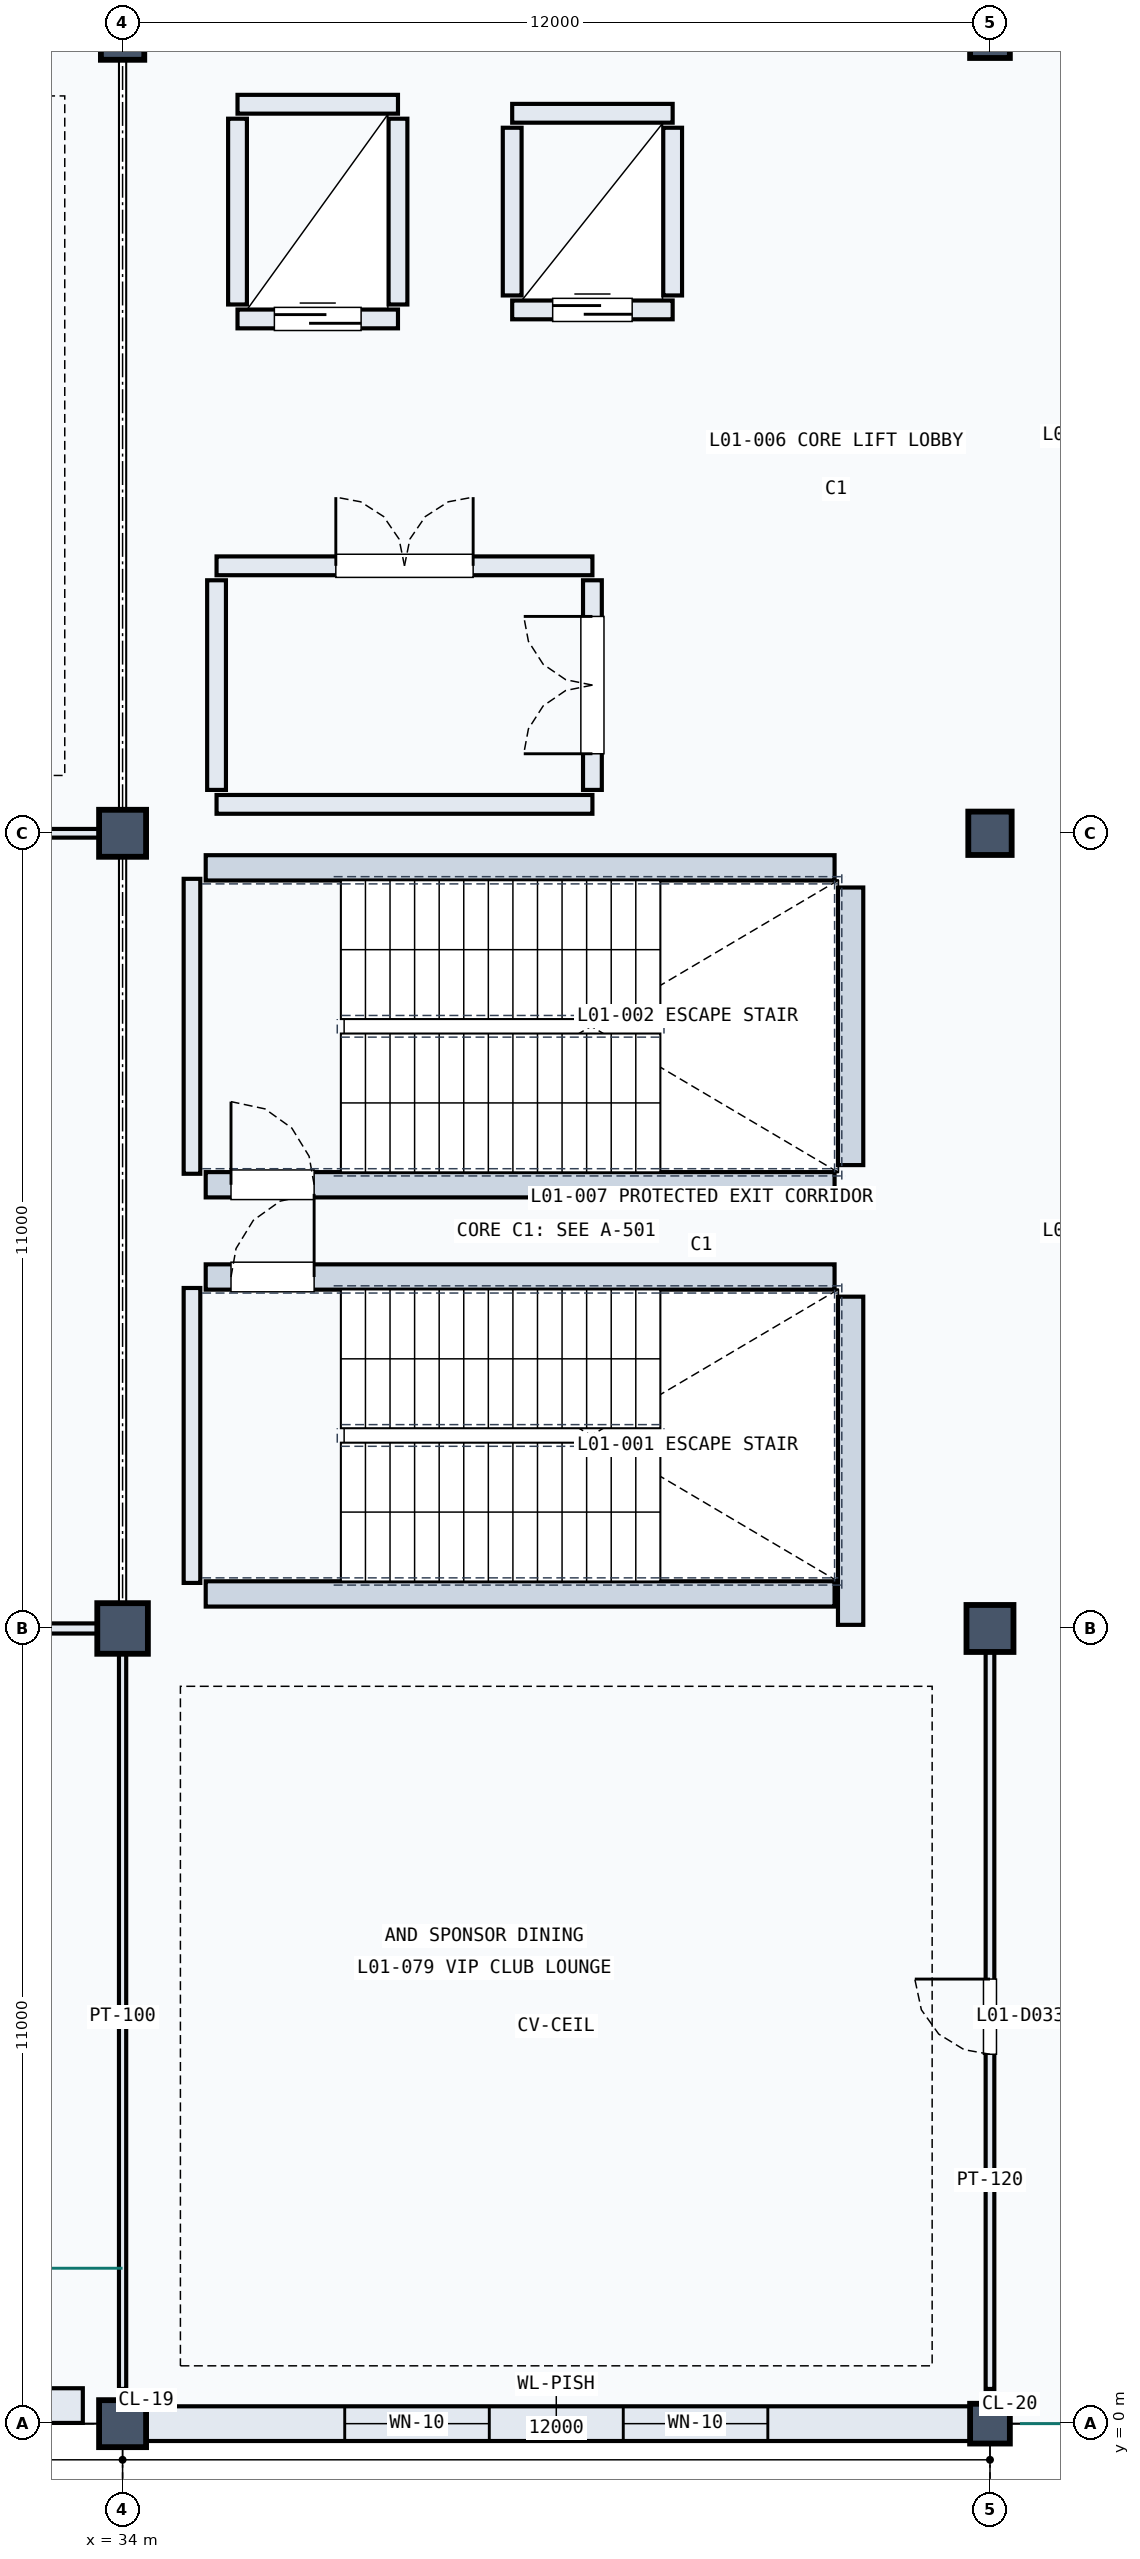
"""IFC4 building model, lengths in metres.
Left out: names, types, materials, properties, quantities, classifications, styles, units other than length and angle.
Written with IfcOpenShell. Run it as: python <this file> out.ifc"""

import sys

from ifc_helpers import new_model, si_unit, direction, frame, frame_2d, origin, origin_2d, place, context, subcontext, project, spatial, rectangle, circle, extrude, element, fill, save


model = new_model("IFC4")
c1 = context("Model", 3, precision=1e-05, world=origin(), true_north=direction((0.0, 1.0)))
c2 = subcontext(c1, "Body", "Model", "MODEL_VIEW")
j1 = project(units=[si_unit("LENGTHUNIT", "METRE"), si_unit("PLANEANGLEUNIT", "RADIAN")], contexts=[c1])
p1 = place(None, origin())
s1 = spatial("IfcSite", under=j1, at=p1, CompositionType="ELEMENT")
p2 = place(p1, origin())
s2 = spatial("IfcBuilding", under=s1, at=p2, CompositionType="ELEMENT")
p3 = place(p2, frame((0.0, 0.0, 5.4)))
s3 = spatial("IfcBuildingStorey", under=s2, at=p3, CompositionType="ELEMENT", Elevation=5.4)
p4 = place(p3, frame((34.0, 0.0, 0.0), z_axis=(0.0, 0.0, 1.0), x_axis=(1.0, 0.0, 0.0)))
e1 = element("IfcColumn", 1, at=p4, inside=s3, PredefinedType="COLUMN", context=c2, shape_type="SweptSolid", body=[
    extrude(circle(Radius=0.325, at=origin_2d()), origin(), (0.0, 0.0, 1.0), 4.8),
])
p5 = place(p3, frame((34.0, 11.0, 0.0), z_axis=(0.0, 0.0, 1.0), x_axis=(1.0, 0.0, 0.0)))
e2 = element("IfcColumn", 2, at=p5, inside=s3, PredefinedType="COLUMN", context=c2, shape_type="SweptSolid", body=[
    extrude(rectangle(XDim=0.7, YDim=0.7, at=origin_2d()), origin(), (0.0, 0.0, 1.0), 4.8),
])
p6 = place(p3, frame((34.0, 22.0, 0.0), z_axis=(0.0, 0.0, 1.0), x_axis=(1.0, 0.0, 0.0)))
e3 = element("IfcColumn", 3, at=p6, inside=s3, PredefinedType="COLUMN", context=c2, shape_type="SweptSolid", body=[
    extrude(rectangle(XDim=0.65, YDim=0.65, at=origin_2d()), origin(), (0.0, 0.0, 1.0), 4.8),
])
p7 = place(p3, frame((34.0, 33.0, 0.0), z_axis=(0.0, 0.0, 1.0), x_axis=(1.0, 0.0, 0.0)))
e4 = element("IfcColumn", 4, at=p7, inside=s3, PredefinedType="COLUMN", context=c2, shape_type="SweptSolid", body=[
    extrude(rectangle(XDim=0.6, YDim=0.6, at=origin_2d()), origin(), (0.0, 0.0, 1.0), 4.8),
])
p8 = place(p3, frame((46.0, 0.0, 0.0), z_axis=(0.0, 0.0, 1.0), x_axis=(1.0, 0.0, 0.0)))
e5 = element("IfcColumn", 5, at=p8, inside=s3, PredefinedType="COLUMN", context=c2, shape_type="SweptSolid", body=[
    extrude(circle(Radius=0.275, at=origin_2d()), origin(), (0.0, 0.0, 1.0), 4.8),
])
p9 = place(p3, frame((46.0, 11.0, 0.0), z_axis=(0.0, 0.0, 1.0), x_axis=(1.0, 0.0, 0.0)))
e6 = element("IfcColumn", 6, at=p9, inside=s3, PredefinedType="COLUMN", context=c2, shape_type="SweptSolid", body=[
    extrude(rectangle(XDim=0.65, YDim=0.65, at=origin_2d()), origin(), (0.0, 0.0, 1.0), 4.8),
])
p10 = place(p3, frame((46.0, 22.0, 0.0), z_axis=(0.0, 0.0, 1.0), x_axis=(1.0, 0.0, 0.0)))
e7 = element("IfcColumn", 7, at=p10, inside=s3, PredefinedType="COLUMN", context=c2, shape_type="SweptSolid", body=[
    extrude(rectangle(XDim=0.6, YDim=0.6, at=origin_2d()), origin(), (0.0, 0.0, 1.0), 4.8),
])
p11 = place(p3, frame((46.0, 33.0, 0.0), z_axis=(0.0, 0.0, 1.0), x_axis=(1.0, 0.0, 0.0)))
e8 = element("IfcColumn", 8, at=p11, inside=s3, PredefinedType="COLUMN", context=c2, shape_type="SweptSolid", body=[
    extrude(rectangle(XDim=0.55, YDim=0.55, at=origin_2d()), origin(), (0.0, 0.0, 1.0), 4.8),
])
p12 = place(p3, frame((30.6, 0.25, 0.0), z_axis=(0.0, 0.0, 1.0), x_axis=(1.0, 0.0, 0.0)))
e9 = element("IfcWall", 9, at=p12, inside=s3, PredefinedType="SOLIDWALL", context=c2, shape_type="SweptSolid", body=[
    extrude(rectangle(XDim=2.85, YDim=0.48, at=frame_2d((1.425, 0.0))), origin(), (0.0, 0.0, 1.0), 4.44),
])
p13 = place(p3, frame((34.22, 0.0, 0.0), z_axis=(0.0, 0.0, 1.0), x_axis=(1.0, 0.0, 0.0)))
e10 = element("IfcWall", 10, at=p13, inside=s3, PredefinedType="SOLIDWALL", context=c2, shape_type="SweptSolid", body=[
    extrude(rectangle(XDim=11.56, YDim=0.48, at=frame_2d((5.78, 0.0))), origin(), (0.0, 0.0, 1.0), 3.59),
])
p14 = place(p13, frame((2.853, 0.0, 0.9)))
e11 = element("IfcOpeningElement", 11, at=p14, cuts=e10, PredefinedType="OPENING", context=c2, shape_type="SweptSolid", body=[
    extrude(rectangle(XDim=2.0, YDim=1.65, at=frame_2d((1.0, 0.825))), frame((0.0, 0.25, 0.0), z_axis=(0.0, -1.0, 0.0), x_axis=(1.0, 0.0, 0.0)), (0.0, 0.0, 1.0), 0.5),
])
p15 = place(p13, frame((6.707, 0.0, 0.9)))
e12 = element("IfcOpeningElement", 12, at=p15, cuts=e10, PredefinedType="OPENING", context=c2, shape_type="SweptSolid", body=[
    extrude(rectangle(XDim=2.0, YDim=1.65, at=frame_2d((1.0, 0.825))), frame((0.0, 0.25, 0.0), z_axis=(0.0, -1.0, 0.0), x_axis=(1.0, 0.0, 0.0)), (0.0, 0.0, 1.0), 0.5),
])
p16 = place(p3, frame((34.96, 11.63, 0.0), z_axis=(0.0, 0.0, 1.0), x_axis=(0.0, 1.0, 0.0)))
e13 = element("IfcWall", 13, at=p16, inside=s3, PredefinedType="SOLIDWALL", context=c2, shape_type="SweptSolid", body=[
    extrude(rectangle(XDim=4.08, YDim=0.23, at=frame_2d((2.04, 0.0))), origin(), (0.0, 0.0, 1.0), 3.79),
])
p17 = place(p3, frame((44.072, 11.05, 0.0), z_axis=(0.0, 0.0, 1.0), x_axis=(0.0, 1.0, 0.0)))
e14 = element("IfcWall", 14, at=p17, inside=s3, PredefinedType="SOLIDWALL", context=c2, shape_type="SweptSolid", body=[
    extrude(rectangle(XDim=4.54, YDim=0.35, at=frame_2d((2.27, 0.0))), origin(), (0.0, 0.0, 1.0), 4.46),
])
p18 = place(p3, frame((35.15, 11.478, 0.0), z_axis=(0.0, 0.0, 1.0), x_axis=(1.0, 0.0, 0.0)))
e15 = element("IfcWall", 15, at=p18, inside=s3, PredefinedType="SOLIDWALL", context=c2, shape_type="SweptSolid", body=[
    extrude(rectangle(XDim=8.7, YDim=0.35, at=frame_2d((4.35, 0.0))), origin(), (0.0, 0.0, 1.0), 4.46),
])
p19 = place(p3, frame((35.15, 15.862, 0.0), z_axis=(0.0, 0.0, 1.0), x_axis=(1.0, 0.0, 0.0)))
e16 = element("IfcWall", 16, at=p19, inside=s3, PredefinedType="SOLIDWALL", context=c2, shape_type="SweptSolid", body=[
    extrude(rectangle(XDim=8.7, YDim=0.35, at=frame_2d((4.35, 0.0))), origin(), (0.0, 0.0, 1.0), 4.46),
])
p20 = place(p19, frame((0.35, 0.0, 0.0)))
e17 = element("IfcOpeningElement", 17, at=p20, cuts=e16, PredefinedType="OPENING", context=c2, shape_type="SweptSolid", body=[
    extrude(rectangle(XDim=1.15, YDim=2.2, at=frame_2d((0.575, 1.1))), frame((0.0, 0.185, 0.0), z_axis=(0.0, -1.0, 0.0), x_axis=(1.0, 0.0, 0.0)), (0.0, 0.0, 1.0), 0.37),
])
p21 = place(p3, frame((34.96, 17.29, 0.0), z_axis=(0.0, 0.0, 1.0), x_axis=(0.0, 1.0, 0.0)))
e18 = element("IfcWall", 18, at=p21, inside=s3, PredefinedType="SOLIDWALL", context=c2, shape_type="SweptSolid", body=[
    extrude(rectangle(XDim=4.08, YDim=0.23, at=frame_2d((2.04, 0.0))), origin(), (0.0, 0.0, 1.0), 3.79),
])
p22 = place(p3, frame((44.072, 17.41, 0.0), z_axis=(0.0, 0.0, 1.0), x_axis=(0.0, 1.0, 0.0)))
e19 = element("IfcWall", 19, at=p22, inside=s3, PredefinedType="SOLIDWALL", context=c2, shape_type="SweptSolid", body=[
    extrude(rectangle(XDim=3.84, YDim=0.35, at=frame_2d((1.92, 0.0))), origin(), (0.0, 0.0, 1.0), 4.46),
])
p23 = place(p3, frame((35.15, 17.138, 0.0), z_axis=(0.0, 0.0, 1.0), x_axis=(1.0, 0.0, 0.0)))
e20 = element("IfcWall", 20, at=p23, inside=s3, PredefinedType="SOLIDWALL", context=c2, shape_type="SweptSolid", body=[
    extrude(rectangle(XDim=8.7, YDim=0.35, at=frame_2d((4.35, 0.0))), origin(), (0.0, 0.0, 1.0), 4.46),
])
p24 = place(p23, frame((0.35, 0.0, 0.0)))
e21 = element("IfcOpeningElement", 21, at=p24, cuts=e20, PredefinedType="OPENING", context=c2, shape_type="SweptSolid", body=[
    extrude(rectangle(XDim=1.15, YDim=2.2, at=frame_2d((0.575, 1.1))), frame((0.0, 0.185, 0.0), z_axis=(0.0, -1.0, 0.0), x_axis=(1.0, 0.0, 0.0)), (0.0, 0.0, 1.0), 0.37),
])
p25 = place(p3, frame((35.15, 21.522, 0.0), z_axis=(0.0, 0.0, 1.0), x_axis=(1.0, 0.0, 0.0)))
e22 = element("IfcWall", 22, at=p25, inside=s3, PredefinedType="SOLIDWALL", context=c2, shape_type="SweptSolid", body=[
    extrude(rectangle(XDim=8.7, YDim=0.35, at=frame_2d((4.35, 0.0))), origin(), (0.0, 0.0, 1.0), 4.46),
])
p26 = place(p3, frame((35.59, 29.115, 0.0), z_axis=(0.0, 0.0, 1.0), x_axis=(1.0, 0.0, 0.0)))
e23 = element("IfcWall", 23, at=p26, inside=s3, PredefinedType="SOLIDWALL", context=c2, shape_type="SweptSolid", body=[
    extrude(rectangle(XDim=2.22, YDim=0.26, at=frame_2d((1.11, 0.0))), origin(), (0.0, 0.0, 1.0), 4.46),
])
p27 = place(p26, frame((0.51, 0.0, 0.0)))
e24 = element("IfcOpeningElement", 24, at=p27, cuts=e23, PredefinedType="OPENING", context=c2, shape_type="SweptSolid", body=[
    extrude(rectangle(XDim=1.2, YDim=2.2, at=frame_2d((0.6, 1.1))), frame((0.0, 0.14, 0.0), z_axis=(0.0, -1.0, 0.0), x_axis=(1.0, 0.0, 0.0)), (0.0, 0.0, 1.0), 0.28),
])
p28 = place(p3, frame((35.59, 32.085, 0.0), z_axis=(0.0, 0.0, 1.0), x_axis=(1.0, 0.0, 0.0)))
e25 = element("IfcWall", 25, at=p28, inside=s3, PredefinedType="SOLIDWALL", context=c2, shape_type="SweptSolid", body=[
    extrude(rectangle(XDim=2.22, YDim=0.26, at=frame_2d((1.11, 0.0))), origin(), (0.0, 0.0, 1.0), 4.46),
])
for number, where, z_axis, x_axis in (
    (26, (35.59, 29.315, 0.0), (0.0, 0.0, 1.0), (0.0, 1.0, 0.0)),
    (27, (37.81, 29.315, 0.0), (0.0, 0.0, 1.0), (0.0, 1.0, 0.0)),
):
    element("IfcWall", number, at=place(p3, frame(where, z_axis=z_axis, x_axis=x_axis)), inside=s3, PredefinedType="SOLIDWALL", context=c2, shape_type="SweptSolid", body=[
        extrude(rectangle(XDim=2.57, YDim=0.26, at=frame_2d((1.285, 0.0))), origin(), (0.0, 0.0, 1.0), 4.46),
    ])
p29 = place(p3, frame((39.39, 29.24, 0.0), z_axis=(0.0, 0.0, 1.0), x_axis=(1.0, 0.0, 0.0)))
e28 = element("IfcWall", 28, at=p29, inside=s3, PredefinedType="SOLIDWALL", context=c2, shape_type="SweptSolid", body=[
    extrude(rectangle(XDim=2.22, YDim=0.26, at=frame_2d((1.11, 0.0))), origin(), (0.0, 0.0, 1.0), 4.46),
])
p30 = place(p29, frame((0.56, 0.0, 0.0)))
e29 = element("IfcOpeningElement", 29, at=p30, cuts=e28, PredefinedType="OPENING", context=c2, shape_type="SweptSolid", body=[
    extrude(rectangle(XDim=1.1, YDim=2.15, at=frame_2d((0.55, 1.075))), frame((0.0, 0.14, 0.0), z_axis=(0.0, -1.0, 0.0), x_axis=(1.0, 0.0, 0.0)), (0.0, 0.0, 1.0), 0.28),
])
p31 = place(p3, frame((39.39, 31.96, 0.0), z_axis=(0.0, 0.0, 1.0), x_axis=(1.0, 0.0, 0.0)))
e30 = element("IfcWall", 30, at=p31, inside=s3, PredefinedType="SOLIDWALL", context=c2, shape_type="SweptSolid", body=[
    extrude(rectangle(XDim=2.22, YDim=0.26, at=frame_2d((1.11, 0.0))), origin(), (0.0, 0.0, 1.0), 4.46),
])
for number, where, z_axis, x_axis in (
    (31, (39.39, 29.44, 0.0), (0.0, 0.0, 1.0), (0.0, 1.0, 0.0)),
    (32, (41.61, 29.44, 0.0), (0.0, 0.0, 1.0), (0.0, 1.0, 0.0)),
):
    element("IfcWall", number, at=place(p3, frame(where, z_axis=z_axis, x_axis=x_axis)), inside=s3, PredefinedType="SOLIDWALL", context=c2, shape_type="SweptSolid", body=[
        extrude(rectangle(XDim=2.32, YDim=0.26, at=frame_2d((1.16, 0.0))), origin(), (0.0, 0.0, 1.0), 4.46),
    ])
p32 = place(p3, frame((35.3, 25.7, 0.0), z_axis=(0.0, 0.0, 1.0), x_axis=(1.0, 0.0, 0.0)))
e33 = element("IfcWall", 33, at=p32, inside=s3, PredefinedType="SOLIDWALL", context=c2, shape_type="SweptSolid", body=[
    extrude(rectangle(XDim=5.2, YDim=0.26, at=frame_2d((2.6, 0.0))), origin(), (0.0, 0.0, 1.0), 4.46),
])
p33 = place(p32, frame((1.65, 0.0, 0.0)))
e34 = element("IfcOpeningElement", 34, at=p33, cuts=e33, PredefinedType="OPENING", context=c2, shape_type="SweptSolid", body=[
    extrude(rectangle(XDim=1.9, YDim=2.2, at=frame_2d((0.95, 1.1))), frame((0.0, 0.14, 0.0), z_axis=(0.0, -1.0, 0.0), x_axis=(1.0, 0.0, 0.0)), (0.0, 0.0, 1.0), 0.28),
])
p34 = place(p3, frame((35.3, 22.4, 0.0), z_axis=(0.0, 0.0, 1.0), x_axis=(1.0, 0.0, 0.0)))
e35 = element("IfcWall", 35, at=p34, inside=s3, PredefinedType="SOLIDWALL", context=c2, shape_type="SweptSolid", body=[
    extrude(rectangle(XDim=5.2, YDim=0.26, at=frame_2d((2.6, 0.0))), origin(), (0.0, 0.0, 1.0), 3.79),
])
p35 = place(p3, frame((35.3, 22.6, 0.0), z_axis=(0.0, 0.0, 1.0), x_axis=(0.0, 1.0, 0.0)))
e36 = element("IfcWall", 36, at=p35, inside=s3, PredefinedType="SOLIDWALL", context=c2, shape_type="SweptSolid", body=[
    extrude(rectangle(XDim=2.9, YDim=0.26, at=frame_2d((1.45, 0.0))), origin(), (0.0, 0.0, 1.0), 4.46),
])
p36 = place(p3, frame((40.5, 22.6, 0.0), z_axis=(0.0, 0.0, 1.0), x_axis=(0.0, 1.0, 0.0)))
e37 = element("IfcWall", 37, at=p36, inside=s3, PredefinedType="SOLIDWALL", context=c2, shape_type="SweptSolid", body=[
    extrude(rectangle(XDim=2.9, YDim=0.26, at=frame_2d((1.45, 0.0))), origin(), (0.0, 0.0, 1.0), 4.46),
])
p37 = place(p36, frame((0.5, 0.0, 0.0)))
e38 = element("IfcOpeningElement", 38, at=p37, cuts=e37, PredefinedType="OPENING", context=c2, shape_type="SweptSolid", body=[
    extrude(rectangle(XDim=1.9, YDim=2.2, at=frame_2d((0.95, 1.1))), frame((0.0, 0.14, 0.0), z_axis=(0.0, -1.0, 0.0), x_axis=(1.0, 0.0, 0.0)), (0.0, 0.0, 1.0), 0.28),
])
p38 = place(p3, frame((22.48, 11.0, 0.0), z_axis=(0.0, 0.0, 1.0), x_axis=(1.0, 0.0, 0.0)))
e39 = element("IfcWall", 39, at=p38, inside=s3, PredefinedType="PARTITIONING", context=c2, shape_type="SweptSolid", body=[
    extrude(rectangle(XDim=11.3, YDim=0.14, at=frame_2d((5.65, 0.0))), origin(), (0.0, 0.0, 1.0), 3.49),
])
p39 = place(p3, frame((22.48, 22.0, 0.0), z_axis=(0.0, 0.0, 1.0), x_axis=(1.0, 0.0, 0.0)))
e40 = element("IfcWall", 40, at=p39, inside=s3, PredefinedType="PARTITIONING", context=c2, shape_type="SweptSolid", body=[
    extrude(rectangle(XDim=11.3, YDim=0.12, at=frame_2d((5.65, 0.0))), origin(), (0.0, 0.0, 1.0), 3.44),
])
p40 = place(p3, frame((46.0, 0.48, 0.0), z_axis=(0.0, 0.0, 1.0), x_axis=(0.0, 1.0, 0.0)))
e41 = element("IfcWall", 41, at=p40, inside=s3, PredefinedType="PARTITIONING", context=c2, shape_type="SweptSolid", body=[
    extrude(rectangle(XDim=10.3, YDim=0.12, at=frame_2d((5.15, 0.0))), origin(), (0.0, 0.0, 1.0), 3.59),
])
p41 = place(p40, frame((4.63, 0.0, 0.0)))
e42 = element("IfcOpeningElement", 42, at=p41, cuts=e41, PredefinedType="OPENING", context=c2, shape_type="SweptSolid", body=[
    extrude(rectangle(XDim=1.04, YDim=2.2, at=frame_2d((0.52, 1.1))), frame((0.0, 0.07, 0.0), z_axis=(0.0, -1.0, 0.0), x_axis=(1.0, 0.0, 0.0)), (0.0, 0.0, 1.0), 0.14),
])
p42 = place(p3, frame((34.0, 0.48, 0.0), z_axis=(0.0, 0.0, 1.0), x_axis=(0.0, 1.0, 0.0)))
e43 = element("IfcWall", 43, at=p42, inside=s3, PredefinedType="PARTITIONING", context=c2, shape_type="SweptSolid", body=[
    extrude(rectangle(XDim=10.3, YDim=0.1, at=frame_2d((5.15, 0.0))), origin(), (0.0, 0.0, 1.0), 3.49),
])
p43 = place(p14, origin())
e44 = element("IfcWindow", 44, at=p43, inside=s3, PartitioningType="SINGLE_PANEL", PredefinedType="WINDOW", context=c2, shape_type="SweptSolid", body=[
    extrude(rectangle(XDim=2.0, YDim=1.65, at=frame_2d((1.0, 0.825))), frame((0.0, 0.03, 0.0), z_axis=(0.0, -1.0, 0.0), x_axis=(1.0, 0.0, 0.0)), (0.0, 0.0, 1.0), 0.06),
])
fill(e11, e44)
p44 = place(p15, origin())
e45 = element("IfcWindow", 45, at=p44, inside=s3, PartitioningType="SINGLE_PANEL", PredefinedType="WINDOW", context=c2, shape_type="SweptSolid", body=[
    extrude(rectangle(XDim=2.0, YDim=1.65, at=frame_2d((1.0, 0.825))), frame((0.0, 0.03, 0.0), z_axis=(0.0, -1.0, 0.0), x_axis=(1.0, 0.0, 0.0)), (0.0, 0.0, 1.0), 0.06),
])
fill(e12, e45)
p45 = place(p20, origin())
e46 = element("IfcDoor", 46, at=p45, inside=s3, OperationType="SINGLE_SWING_RIGHT", PredefinedType="DOOR", context=c2, shape_type="SweptSolid", body=[
    extrude(rectangle(XDim=1.15, YDim=2.2, at=frame_2d((0.575, 1.1))), frame((0.0, 0.025, 0.0), z_axis=(0.0, -1.0, 0.0), x_axis=(1.0, 0.0, 0.0)), (0.0, 0.0, 1.0), 0.05),
])
fill(e17, e46)
p46 = place(p24, origin())
e47 = element("IfcDoor", 47, at=p46, inside=s3, OperationType="SINGLE_SWING_LEFT", PredefinedType="DOOR", context=c2, shape_type="SweptSolid", body=[
    extrude(rectangle(XDim=1.15, YDim=2.2, at=frame_2d((0.575, 1.1))), frame((0.0, 0.025, 0.0), z_axis=(0.0, -1.0, 0.0), x_axis=(1.0, 0.0, 0.0)), (0.0, 0.0, 1.0), 0.05),
])
fill(e21, e47)
p47 = place(p27, origin())
e48 = element("IfcDoor", 48, at=p47, inside=s3, OperationType="SLIDING_TO_LEFT", PredefinedType="DOOR", context=c2, shape_type="SweptSolid", body=[
    extrude(rectangle(XDim=1.2, YDim=2.2, at=frame_2d((0.6, 1.1))), frame((0.0, 0.025, 0.0), z_axis=(0.0, -1.0, 0.0), x_axis=(1.0, 0.0, 0.0)), (0.0, 0.0, 1.0), 0.05),
])
fill(e24, e48)
p48 = place(p30, origin())
e49 = element("IfcDoor", 49, at=p48, inside=s3, OperationType="SLIDING_TO_LEFT", PredefinedType="DOOR", context=c2, shape_type="SweptSolid", body=[
    extrude(rectangle(XDim=1.1, YDim=2.15, at=frame_2d((0.55, 1.075))), frame((0.0, 0.025, 0.0), z_axis=(0.0, -1.0, 0.0), x_axis=(1.0, 0.0, 0.0)), (0.0, 0.0, 1.0), 0.05),
])
fill(e29, e49)
p49 = place(p33, origin())
e50 = element("IfcDoor", 50, at=p49, inside=s3, OperationType="DOUBLE_DOOR_SINGLE_SWING", PredefinedType="DOOR", context=c2, shape_type="SweptSolid", body=[
    extrude(rectangle(XDim=1.9, YDim=2.2, at=frame_2d((0.95, 1.1))), frame((0.0, 0.025, 0.0), z_axis=(0.0, -1.0, 0.0), x_axis=(1.0, 0.0, 0.0)), (0.0, 0.0, 1.0), 0.05),
])
fill(e34, e50)
p50 = place(p37, origin())
e51 = element("IfcDoor", 51, at=p50, inside=s3, OperationType="DOUBLE_DOOR_SINGLE_SWING", PredefinedType="DOOR", context=c2, shape_type="SweptSolid", body=[
    extrude(rectangle(XDim=1.9, YDim=2.2, at=frame_2d((0.95, 1.1))), frame((0.0, 0.025, 0.0), z_axis=(0.0, -1.0, 0.0), x_axis=(1.0, 0.0, 0.0)), (0.0, 0.0, 1.0), 0.05),
])
fill(e38, e51)
p51 = place(p41, origin())
e52 = element("IfcDoor", 52, at=p51, inside=s3, OperationType="SINGLE_SWING_RIGHT", PredefinedType="DOOR", context=c2, shape_type="SweptSolid", body=[
    extrude(rectangle(XDim=1.04, YDim=2.2, at=frame_2d((0.52, 1.1))), frame((0.0, 0.025, 0.0), z_axis=(0.0, -1.0, 0.0), x_axis=(1.0, 0.0, 0.0)), (0.0, 0.0, 1.0), 0.05),
])
fill(e42, e52)
save(model, sys.argv[1])
